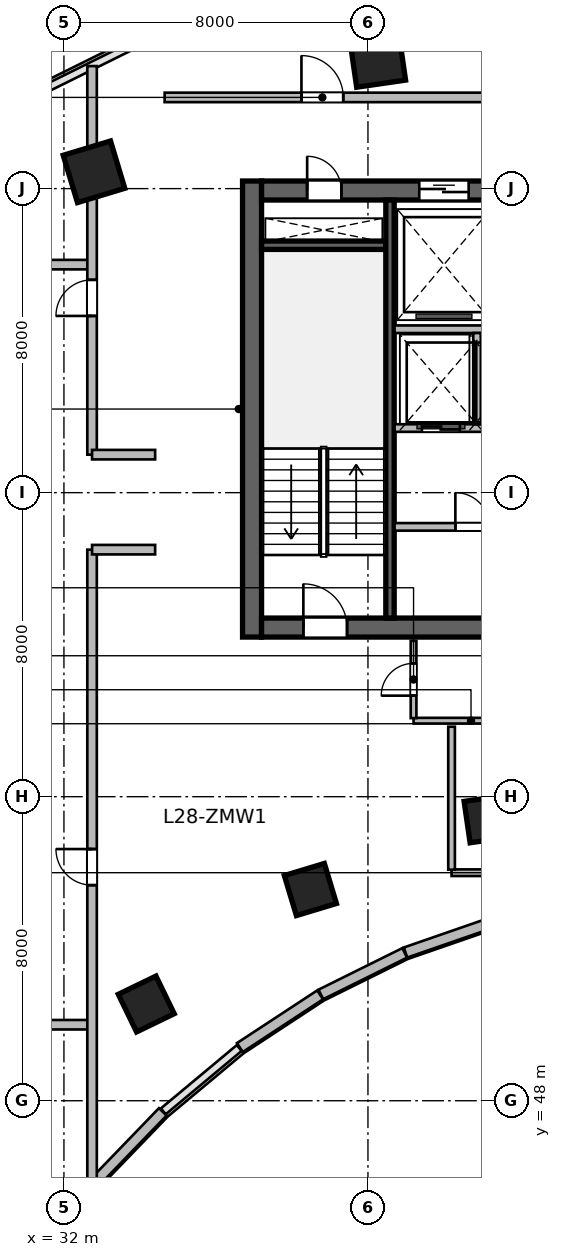
"""IFC4 building model, lengths in metres.
Left out: names, types, materials, properties, quantities, classifications, styles, units other than length and angle.
Written with IfcOpenShell. Run it as: python <this file> out.ifc"""

import sys

from ifc_helpers import new_model, si_unit, direction, frame, frame_2d, origin, origin_2d, place, context, subcontext, project, spatial, rectangle, extrude, source, transform, mapped, element, fill, save


model = new_model("IFC4")
c1 = context("Model", 3, precision=1e-05, world=origin(), true_north=direction((0.0, 1.0)))
c2 = subcontext(c1, "Body", "Model", "MODEL_VIEW")
j1 = project(units=[si_unit("LENGTHUNIT", "METRE"), si_unit("PLANEANGLEUNIT", "RADIAN")], contexts=[c1])
p1 = place(None, origin())
s1 = spatial("IfcSite", under=j1, at=p1, CompositionType="ELEMENT")
p2 = place(p1, origin())
s2 = spatial("IfcBuilding", under=s1, at=p2, CompositionType="ELEMENT")
p3 = place(p2, frame((0.0, 0.0, 119.4)))
s3 = spatial("IfcBuildingStorey", under=s2, at=p3, CompositionType="ELEMENT", Elevation=119.4)
m1 = source(origin(), c2, "Body", "SweptSolid", [
    extrude(rectangle(XDim=12.0, YDim=0.5, at=frame_2d((6.0, 0.0))), origin(), (0.0, 0.0, 1.0), 3.9),
])
p4 = place(p3, frame((36.95, 60.2, 0.0), z_axis=(0.0, 0.0, 1.0), x_axis=(0.0, 1.0, 0.0)))
e1 = element("IfcWall", 1, at=p4, inside=s3, PredefinedType="SHEAR", context=c2, shape_type="MappedRepresentation", body=[
    mapped(m1, transform((0.0, 0.0, 0.0), scale=1.0)),
])
m2 = source(origin(), c2, "Body", "SweptSolid", [
    extrude(rectangle(XDim=21.6, YDim=0.5, at=frame_2d((10.8, 0.0))), origin(), (0.0, 0.0, 1.0), 3.9),
])
p5 = place(p3, frame((37.2, 60.45, 0.0), z_axis=(0.0, 0.0, 1.0), x_axis=(1.0, 0.0, 0.0)))
e2 = element("IfcWall", 2, at=p5, inside=s3, PredefinedType="SHEAR", context=c2, shape_type="MappedRepresentation", body=[
    mapped(m2, transform((0.0, 0.0, 0.0), scale=1.0)),
])
p6 = place(p5, frame((1.1, 0.0, 0.0)))
e3 = element("IfcOpeningElement", 3, at=p6, cuts=e2, PredefinedType="OPENING", context=c2, shape_type="SweptSolid", body=[
    extrude(rectangle(XDim=1.15, YDim=2.15, at=frame_2d((0.575, 1.075))), frame((0.0, 0.26, 0.0), z_axis=(0.0, -1.0, 0.0), x_axis=(1.0, 0.0, 0.0)), (0.0, 0.0, 1.0), 0.52),
])
p7 = place(p5, frame((19.5, 0.0, 0.0)))
e4 = element("IfcOpeningElement", 4, at=p7, cuts=e2, PredefinedType="OPENING", context=c2, shape_type="SweptSolid", body=[
    extrude(rectangle(XDim=0.9, YDim=2.1, at=frame_2d((0.45, 1.05))), frame((0.0, 0.26, 0.0), z_axis=(0.0, -1.0, 0.0), x_axis=(1.0, 0.0, 0.0)), (0.0, 0.0, 1.0), 0.52),
])
p8 = place(p5, frame((12.02, 0.0, 0.0)))
e5 = element("IfcOpeningElement", 5, at=p8, cuts=e2, PredefinedType="OPENING", context=c2, shape_type="SweptSolid", body=[
    extrude(rectangle(XDim=1.6, YDim=2.15, at=frame_2d((0.8, 1.075))), frame((0.0, 0.26, 0.0), z_axis=(0.0, -1.0, 0.0), x_axis=(1.0, 0.0, 0.0)), (0.0, 0.0, 1.0), 0.52),
])
p9 = place(p3, frame((37.2, 71.95, 0.0), z_axis=(0.0, 0.0, 1.0), x_axis=(1.0, 0.0, 0.0)))
e6 = element("IfcWall", 6, at=p9, inside=s3, PredefinedType="SHEAR", context=c2, shape_type="MappedRepresentation", body=[
    mapped(m2, transform((0.0, 0.0, 0.0), scale=1.0)),
])
p10 = place(p9, frame((1.2, 0.0, 0.0)))
e7 = element("IfcOpeningElement", 7, at=p10, cuts=e6, PredefinedType="OPENING", context=c2, shape_type="SweptSolid", body=[
    extrude(rectangle(XDim=0.9, YDim=2.1, at=frame_2d((0.45, 1.05))), frame((0.0, 0.26, 0.0), z_axis=(0.0, -1.0, 0.0), x_axis=(1.0, 0.0, 0.0)), (0.0, 0.0, 1.0), 0.52),
])
p11 = place(p9, frame((14.7, 0.0, 0.0)))
e8 = element("IfcOpeningElement", 8, at=p11, cuts=e6, PredefinedType="OPENING", context=c2, shape_type="SweptSolid", body=[
    extrude(rectangle(XDim=1.2, YDim=2.15, at=frame_2d((0.6, 1.075))), frame((0.0, 0.26, 0.0), z_axis=(0.0, -1.0, 0.0), x_axis=(1.0, 0.0, 0.0)), (0.0, 0.0, 1.0), 0.52),
])
p12 = place(p9, frame((4.15, 0.0, 0.0)))
e9 = element("IfcOpeningElement", 9, at=p12, cuts=e6, PredefinedType="OPENING", context=c2, shape_type="SweptSolid", body=[
    extrude(rectangle(XDim=1.3, YDim=2.15, at=frame_2d((0.65, 1.075))), frame((0.0, 0.26, 0.0), z_axis=(0.0, -1.0, 0.0), x_axis=(1.0, 0.0, 0.0)), (0.0, 0.0, 1.0), 0.52),
])
p13 = place(p9, frame((7.25, 0.0, 0.0)))
e10 = element("IfcOpeningElement", 10, at=p13, cuts=e6, PredefinedType="OPENING", context=c2, shape_type="SweptSolid", body=[
    extrude(rectangle(XDim=0.9, YDim=2.1, at=frame_2d((0.45, 1.05))), frame((0.0, 0.26, 0.0), z_axis=(0.0, -1.0, 0.0), x_axis=(1.0, 0.0, 0.0)), (0.0, 0.0, 1.0), 0.52),
])
m3 = source(origin(), c2, "Body", "SweptSolid", [
    extrude(rectangle(XDim=3.27, YDim=0.22, at=frame_2d((1.635, 0.0))), origin(), (0.0, 0.0, 1.0), 3.9),
])
p14 = place(p3, frame((37.2, 70.51, 0.0), z_axis=(0.0, 0.0, 1.0), x_axis=(1.0, 0.0, 0.0)))
e11 = element("IfcWall", 11, at=p14, inside=s3, PredefinedType="SHEAR", context=c2, shape_type="MappedRepresentation", body=[
    mapped(m3, transform((0.0, 0.0, 0.0), scale=1.0)),
])
m4 = source(origin(), c2, "Body", "SweptSolid", [
    extrude(rectangle(XDim=11.0, YDim=0.22, at=frame_2d((5.5, 0.0))), origin(), (0.0, 0.0, 1.0), 3.9),
])
p15 = place(p3, frame((40.58, 60.7, 0.0), z_axis=(0.0, 0.0, 1.0), x_axis=(0.0, 1.0, 0.0)))
e12 = element("IfcWall", 12, at=p15, inside=s3, PredefinedType="SHEAR", context=c2, shape_type="MappedRepresentation", body=[
    mapped(m4, transform((0.0, 0.0, 0.0), scale=1.0)),
])
m5 = source(origin(), c2, "Body", "SweptSolid", [
    extrude(rectangle(XDim=1.1, YDim=1.1, at=origin_2d()), origin(), (0.0, 0.0, 1.0), 3.9),
])
for number, where, z_axis, x_axis in (
    (13, (34.166, 50.545, 0.0), (0.0, 0.0, 1.0), (-0.436, 0.9, 0.0)),
    (14, (38.485, 53.558, 0.0), (0.0, 0.0, 1.0), (-0.289, 0.957, 0.0)),
):
    element("IfcColumn", number, at=place(p3, frame(where, z_axis=z_axis, x_axis=x_axis)), inside=s3, PredefinedType="COLUMN", context=c2, shape_type="MappedRepresentation", body=[
        mapped(m5, transform((0.0, 0.0, 0.0), scale=1.0)),
    ])
m6 = source(origin(), c2, "Body", "SweptSolid", [
    extrude(rectangle(XDim=1.3, YDim=1.3, at=origin_2d()), origin(), (0.0, 0.0, 1.0), 3.9),
])
p16 = place(p3, frame((32.791, 72.442, 0.0), z_axis=(0.0, 0.0, 1.0), x_axis=(-0.288697611798, 0.957420330337, 0.0)))
e15 = element("IfcColumn", 15, at=p16, inside=s3, PredefinedType="COLUMN", context=c2, shape_type="MappedRepresentation", body=[
    mapped(m6, transform((0.0, 0.0, 0.0), scale=1.0)),
])
p17 = place(p3, frame((43.154, 55.411, 0.0), z_axis=(0.0, 0.0, 1.0), x_axis=(-0.143492621991, 0.98965138682, 0.0)))
e16 = element("IfcColumn", 16, at=p17, inside=s3, PredefinedType="COLUMN", context=c2, shape_type="MappedRepresentation", body=[
    mapped(m5, transform((0.0, 0.0, 0.0), scale=1.0)),
])
p18 = place(p3, frame((40.253, 75.404, 0.0), z_axis=(0.0, 0.0, 1.0), x_axis=(-0.143492621991, 0.98965138682, 0.0)))
e17 = element("IfcColumn", 17, at=p18, inside=s3, PredefinedType="COLUMN", context=c2, shape_type="MappedRepresentation", body=[
    mapped(m6, transform((0.0, 0.0, 0.0), scale=1.0)),
])
m7 = source(origin(), c2, "Body", "SweptSolid", [
    extrude(rectangle(XDim=2.411, YDim=0.28, at=frame_2d((1.205, 0.0))), origin(), (0.0, 0.0, 1.0), 3.65),
])
p19 = place(p3, frame((43.266, 52.689, 0.0), z_axis=(0.0, 0.0, 1.0), x_axis=(-0.944880068161, -0.327416640982, 0.0)))
e18 = element("IfcWall", 18, at=p19, inside=s3, PredefinedType="SOLIDWALL", context=c2, shape_type="MappedRepresentation", body=[
    mapped(m7, transform((0.0, 0.0, 0.0), scale=1.0)),
])
m8 = source(origin(), c2, "Body", "SweptSolid", [
    extrude(rectangle(XDim=2.462, YDim=0.28, at=frame_2d((1.231, 0.0))), origin(), (0.0, 0.0, 1.0), 3.65),
])
p20 = place(p3, frame((40.967, 51.891, 0.0), z_axis=(0.0, 0.0, 1.0), x_axis=(-0.8959882207, -0.444077817917, 0.0)))
e19 = element("IfcWall", 19, at=p20, inside=s3, PredefinedType="SOLIDWALL", context=c2, shape_type="MappedRepresentation", body=[
    mapped(m8, transform((0.0, 0.0, 0.0), scale=1.0)),
])
m9 = source(origin(), c2, "Body", "SweptSolid", [
    extrude(rectangle(XDim=2.527, YDim=0.28, at=frame_2d((1.264, 0.0))), origin(), (0.0, 0.0, 1.0), 3.65),
])
p21 = place(p3, frame((38.742, 50.786, 0.0), z_axis=(0.0, 0.0, 1.0), x_axis=(-0.836011905051, -0.548711303523, 0.0)))
e20 = element("IfcWall", 20, at=p21, inside=s3, PredefinedType="SOLIDWALL", context=c2, shape_type="MappedRepresentation", body=[
    mapped(m9, transform((0.0, 0.0, 0.0), scale=1.0)),
])
m10 = source(origin(), c2, "Body", "SweptSolid", [
    extrude(rectangle(XDim=2.68, YDim=0.28, at=frame_2d((1.34, 0.0))), origin(), (0.0, 0.0, 1.0), 3.65),
])
p22 = place(p3, frame((34.601, 47.708, 0.0), z_axis=(0.0, 0.0, 1.0), x_axis=(-0.694561996568, -0.719432855049, 0.0)))
e21 = element("IfcWall", 21, at=p22, inside=s3, PredefinedType="SOLIDWALL", context=c2, shape_type="MappedRepresentation", body=[
    mapped(m10, transform((0.0, 0.0, 0.0), scale=1.0)),
])
m11 = source(origin(), c2, "Body", "SweptSolid", [
    extrude(rectangle(XDim=8.8, YDim=0.2, at=frame_2d((4.4, 0.0))), origin(), (0.0, 0.0, 1.0), 3.65),
])
p23 = place(p3, frame((40.7, 68.3, 0.0), z_axis=(0.0, 0.0, 1.0), x_axis=(1.0, 0.0, 0.0)))
e22 = element("IfcWall", 22, at=p23, inside=s3, PredefinedType="SOLIDWALL", context=c2, shape_type="MappedRepresentation", body=[
    mapped(m11, transform((0.0, 0.0, 0.0), scale=1.0)),
])
m12 = source(origin(), c2, "Body", "SweptSolid", [
    extrude(rectangle(XDim=8.02, YDim=0.2, at=frame_2d((4.01, 0.0))), origin(), (0.0, 0.0, 1.0), 3.65),
])
p24 = place(p3, frame((40.7, 63.1, 0.0), z_axis=(0.0, 0.0, 1.0), x_axis=(1.0, 0.0, 0.0)))
e23 = element("IfcWall", 23, at=p24, inside=s3, PredefinedType="SOLIDWALL", context=c2, shape_type="MappedRepresentation", body=[
    mapped(m12, transform((0.0, 0.0, 0.0), scale=1.0)),
])
p25 = place(p24, frame((1.6, 0.0, 0.0)))
e24 = element("IfcOpeningElement", 24, at=p25, cuts=e23, PredefinedType="OPENING", context=c2, shape_type="SweptSolid", body=[
    extrude(rectangle(XDim=0.9, YDim=2.1, at=frame_2d((0.45, 1.05))), frame((0.0, 0.11, 0.0), z_axis=(0.0, -1.0, 0.0), x_axis=(1.0, 0.0, 0.0)), (0.0, 0.0, 1.0), 0.22),
])
p26 = place(p24, frame((5.54, 0.0, 0.0)))
e25 = element("IfcOpeningElement", 25, at=p26, cuts=e23, PredefinedType="OPENING", context=c2, shape_type="SweptSolid", body=[
    extrude(rectangle(XDim=0.9, YDim=2.1, at=frame_2d((0.45, 1.05))), frame((0.0, 0.11, 0.0), z_axis=(0.0, -1.0, 0.0), x_axis=(1.0, 0.0, 0.0)), (0.0, 0.0, 1.0), 0.22),
])
p27 = place(p3, frame((40.7, 65.7, 0.0), z_axis=(0.0, 0.0, 1.0), x_axis=(1.0, 0.0, 0.0)))
e26 = element("IfcWall", 26, at=p27, inside=s3, PredefinedType="SOLIDWALL", context=c2, shape_type="MappedRepresentation", body=[
    mapped(m11, transform((0.0, 0.0, 0.0), scale=1.0)),
])
p28 = place(p27, frame((0.72, 0.0, 0.0)))
e27 = element("IfcOpeningElement", 27, at=p28, cuts=e26, PredefinedType="OPENING", context=c2, shape_type="SweptSolid", body=[
    extrude(rectangle(XDim=1.0, YDim=2.15, at=frame_2d((0.5, 1.075))), frame((0.0, 0.11, 0.0), z_axis=(0.0, -1.0, 0.0), x_axis=(1.0, 0.0, 0.0)), (0.0, 0.0, 1.0), 0.22),
])
p29 = place(p27, frame((2.62, 0.0, 0.0)))
e28 = element("IfcOpeningElement", 28, at=p29, cuts=e26, PredefinedType="OPENING", context=c2, shape_type="SweptSolid", body=[
    extrude(rectangle(XDim=1.0, YDim=2.15, at=frame_2d((0.5, 1.075))), frame((0.0, 0.11, 0.0), z_axis=(0.0, -1.0, 0.0), x_axis=(1.0, 0.0, 0.0)), (0.0, 0.0, 1.0), 0.22),
])
p30 = place(p27, frame((4.55, 0.0, 0.0)))
e29 = element("IfcOpeningElement", 29, at=p30, cuts=e26, PredefinedType="OPENING", context=c2, shape_type="SweptSolid", body=[
    extrude(rectangle(XDim=1.0, YDim=2.15, at=frame_2d((0.5, 1.075))), frame((0.0, 0.11, 0.0), z_axis=(0.0, -1.0, 0.0), x_axis=(1.0, 0.0, 0.0)), (0.0, 0.0, 1.0), 0.22),
])
p31 = place(p27, frame((6.55, 0.0, 0.0)))
e30 = element("IfcOpeningElement", 30, at=p31, cuts=e26, PredefinedType="OPENING", context=c2, shape_type="SweptSolid", body=[
    extrude(rectangle(XDim=1.0, YDim=2.15, at=frame_2d((0.5, 1.075))), frame((0.0, 0.11, 0.0), z_axis=(0.0, -1.0, 0.0), x_axis=(1.0, 0.0, 0.0)), (0.0, 0.0, 1.0), 0.22),
])
m13 = source(origin(), c2, "Body", "SweptSolid", [
    extrude(rectangle(XDim=2.4, YDim=0.2, at=frame_2d((1.2, 0.0))), origin(), (0.0, 0.0, 1.0), 3.65),
])
p32 = place(p3, frame((42.87, 65.8, 0.0), z_axis=(0.0, 0.0, 1.0), x_axis=(0.0, 1.0, 0.0)))
e31 = element("IfcWall", 31, at=p32, inside=s3, PredefinedType="SOLIDWALL", context=c2, shape_type="MappedRepresentation", body=[
    mapped(m13, transform((0.0, 0.0, 0.0), scale=1.0)),
])
m14 = source(origin(), c2, "Body", "SweptSolid", [
    extrude(rectangle(XDim=5.4, YDim=0.15, at=frame_2d((2.7, 0.0))), origin(), (0.0, 0.0, 1.0), 3.65),
])
p33 = place(p3, frame((41.2, 58.0, 0.0), z_axis=(0.0, 0.0, 1.0), x_axis=(1.0, 0.0, 0.0)))
e32 = element("IfcWall", 32, at=p33, inside=s3, PredefinedType="PARTITIONING", context=c2, shape_type="MappedRepresentation", body=[
    mapped(m14, transform((0.0, 0.0, 0.0), scale=1.0)),
])
p34 = place(p33, frame((2.25, 0.0, 0.0)))
e33 = element("IfcOpeningElement", 33, at=p34, cuts=e32, PredefinedType="OPENING", context=c2, shape_type="SweptSolid", body=[
    extrude(rectangle(XDim=0.9, YDim=2.08, at=frame_2d((0.45, 1.04))), frame((0.0, 0.085, 0.0), z_axis=(0.0, -1.0, 0.0), x_axis=(1.0, 0.0, 0.0)), (0.0, 0.0, 1.0), 0.17),
])
m15 = source(origin(), c2, "Body", "SweptSolid", [
    extrude(rectangle(XDim=2.033, YDim=0.15, at=frame_2d((1.016, 0.0))), origin(), (0.0, 0.0, 1.0), 3.65),
])
p35 = place(p3, frame((41.2, 58.067, 0.0), z_axis=(0.0, 0.0, 1.0), x_axis=(0.0, 1.0, 0.0)))
e34 = element("IfcWall", 34, at=p35, inside=s3, PredefinedType="PARTITIONING", context=c2, shape_type="MappedRepresentation", body=[
    mapped(m15, transform((0.0, 0.0, 0.0), scale=1.0)),
])
p36 = place(p35, frame((0.591, 0.0, 0.0)))
e35 = element("IfcOpeningElement", 35, at=p36, cuts=e34, PredefinedType="OPENING", context=c2, shape_type="SweptSolid", body=[
    extrude(rectangle(XDim=0.85, YDim=2.1, at=frame_2d((0.425, 1.05))), frame((0.0, 0.085, 0.0), z_axis=(0.0, -1.0, 0.0), x_axis=(1.0, 0.0, 0.0)), (0.0, 0.0, 1.0), 0.17),
])
m16 = source(origin(), c2, "Body", "SweptSolid", [
    extrude(rectangle(XDim=4.176, YDim=0.175, at=frame_2d((2.088, 0.0))), origin(), (0.0, 0.0, 1.0), 3.65),
])
p37 = place(p3, frame((42.2, 54.0, 0.0), z_axis=(0.0, 0.0, 1.0), x_axis=(1.0, 0.0, 0.0)))
e36 = element("IfcWall", 36, at=p37, inside=s3, PredefinedType="PARTITIONING", context=c2, shape_type="MappedRepresentation", body=[
    mapped(m16, transform((0.0, 0.0, 0.0), scale=1.0)),
])
m17 = source(origin(), c2, "Body", "SweptSolid", [
    extrude(rectangle(XDim=3.763, YDim=0.175, at=frame_2d((1.881, 0.0))), origin(), (0.0, 0.0, 1.0), 3.65),
])
p38 = place(p3, frame((42.2, 54.079, 0.0), z_axis=(0.0, 0.0, 1.0), x_axis=(0.0, 1.0, 0.0)))
e37 = element("IfcWall", 37, at=p38, inside=s3, PredefinedType="PARTITIONING", context=c2, shape_type="MappedRepresentation", body=[
    mapped(m17, transform((0.0, 0.0, 0.0), scale=1.0)),
])
m18 = source(origin(), c2, "Body", "SweptSolid", [
    extrude(rectangle(XDim=2.5, YDim=0.25, at=frame_2d((1.25, 0.0))), origin(), (0.0, 0.0, 1.0), 3.65),
])
for number, where, z_axis, x_axis in (
    (38, (30.2, 50.0, 0.0), (0.0, 0.0, 1.0), (1.0, 0.0, 0.0)),
    (39, (30.2, 70.0, 0.0), (0.0, 0.0, 1.0), (1.0, 0.0, 0.0)),
):
    element("IfcWall", number, at=place(p3, frame(where, z_axis=z_axis, x_axis=x_axis)), inside=s3, PredefinedType="PARTITIONING", context=c2, shape_type="MappedRepresentation", body=[
        mapped(m18, transform((0.0, 0.0, 0.0), scale=1.0)),
    ])
m19 = source(origin(), c2, "Body", "SweptSolid", [
    extrude(rectangle(XDim=9.2, YDim=0.25, at=frame_2d((4.6, 0.0))), origin(), (0.0, 0.0, 1.0), 3.022),
])
p39 = place(p3, frame((34.65, 74.4, 0.0), z_axis=(0.0, 0.0, 1.0), x_axis=(1.0, 0.0, 0.0)))
e40 = element("IfcWall", 40, at=p39, inside=s3, PredefinedType="PARTITIONING", context=c2, shape_type="MappedRepresentation", body=[
    mapped(m19, transform((0.0, 0.0, 0.0), scale=1.0)),
])
p40 = place(p39, frame((3.6, 0.0, 0.0)))
e41 = element("IfcOpeningElement", 41, at=p40, cuts=e40, PredefinedType="OPENING", context=c2, shape_type="SweptSolid", body=[
    extrude(rectangle(XDim=1.1, YDim=2.15, at=frame_2d((0.55, 1.075))), frame((0.0, 0.135, 0.0), z_axis=(0.0, -1.0, 0.0), x_axis=(1.0, 0.0, 0.0)), (0.0, 0.0, 1.0), 0.27),
])
m20 = source(origin(), c2, "Body", "SweptSolid", [
    extrude(rectangle(XDim=16.706, YDim=0.25, at=frame_2d((8.353, 0.0))), origin(), (0.0, 0.0, 1.0), 2.942),
])
p41 = place(p3, frame((32.74, 45.794, 0.0), z_axis=(0.0, 0.0, 1.0), x_axis=(0.0, 1.0, 0.0)))
e42 = element("IfcWall", 42, at=p41, inside=s3, PredefinedType="PARTITIONING", context=c2, shape_type="MappedRepresentation", body=[
    mapped(m20, transform((0.0, 0.0, 0.0), scale=1.0)),
])
p42 = place(p41, frame((7.878, 0.0, 0.0)))
e43 = element("IfcOpeningElement", 43, at=p42, cuts=e42, PredefinedType="OPENING", context=c2, shape_type="SweptSolid", body=[
    extrude(rectangle(XDim=0.95, YDim=2.1, at=frame_2d((0.475, 1.05))), frame((0.0, 0.135, 0.0), z_axis=(0.0, -1.0, 0.0), x_axis=(1.0, 0.0, 0.0)), (0.0, 0.0, 1.0), 0.27),
])
m21 = source(origin(), c2, "Body", "SweptSolid", [
    extrude(rectangle(XDim=1.66, YDim=0.25, at=frame_2d((0.83, 0.0))), origin(), (0.0, 0.0, 1.0), 3.65),
])
p43 = place(p3, frame((32.74, 62.5, 0.0), z_axis=(0.0, 0.0, 1.0), x_axis=(1.0, 0.0, 0.0)))
e44 = element("IfcWall", 44, at=p43, inside=s3, PredefinedType="PARTITIONING", context=c2, shape_type="MappedRepresentation", body=[
    mapped(m21, transform((0.0, 0.0, 0.0), scale=1.0)),
])
m22 = source(origin(), c2, "Body", "SweptSolid", [
    extrude(rectangle(XDim=10.224, YDim=0.25, at=frame_2d((5.112, 0.0))), origin(), (0.0, 0.0, 1.0), 3.65),
])
p44 = place(p3, frame((32.74, 65.0, 0.0), z_axis=(0.0, 0.0, 1.0), x_axis=(0.0, 1.0, 0.0)))
e45 = element("IfcWall", 45, at=p44, inside=s3, PredefinedType="PARTITIONING", context=c2, shape_type="MappedRepresentation", body=[
    mapped(m22, transform((0.0, 0.0, 0.0), scale=1.0)),
])
p45 = place(p44, frame((3.65, 0.0, 0.0)))
e46 = element("IfcOpeningElement", 46, at=p45, cuts=e45, PredefinedType="OPENING", context=c2, shape_type="SweptSolid", body=[
    extrude(rectangle(XDim=0.95, YDim=2.1, at=frame_2d((0.475, 1.05))), frame((0.0, 0.135, 0.0), z_axis=(0.0, -1.0, 0.0), x_axis=(1.0, 0.0, 0.0)), (0.0, 0.0, 1.0), 0.27),
])
p46 = place(p3, frame((32.74, 65.0, 0.0), z_axis=(0.0, 0.0, 1.0), x_axis=(1.0, 0.0, 0.0)))
e47 = element("IfcWall", 47, at=p46, inside=s3, PredefinedType="PARTITIONING", context=c2, shape_type="MappedRepresentation", body=[
    mapped(m21, transform((0.0, 0.0, 0.0), scale=1.0)),
])
m23 = source(origin(), c2, "Body", "SweptSolid", [
    extrude(rectangle(XDim=1.15, YDim=2.15, at=frame_2d((0.575, 1.075))), frame((0.0, 0.025, 0.0), z_axis=(0.0, -1.0, 0.0), x_axis=(1.0, 0.0, 0.0)), (0.0, 0.0, 1.0), 0.05),
])
p47 = place(p6, origin())
e48 = element("IfcDoor", 48, at=p47, inside=s3, OperationType="SINGLE_SWING_LEFT", PredefinedType="DOOR", context=c2, shape_type="MappedRepresentation", body=[
    mapped(m23, transform((0.0, 0.0, 0.0), scale=1.0)),
])
fill(e3, e48)
m24 = source(origin(), c2, "Body", "SweptSolid", [
    extrude(rectangle(XDim=0.9, YDim=2.1, at=frame_2d((0.45, 1.05))), frame((0.0, 0.025, 0.0), z_axis=(0.0, -1.0, 0.0), x_axis=(1.0, 0.0, 0.0)), (0.0, 0.0, 1.0), 0.05),
])
p48 = place(p10, origin())
e49 = element("IfcDoor", 49, at=p48, inside=s3, OperationType="SINGLE_SWING_LEFT", PredefinedType="DOOR", context=c2, shape_type="MappedRepresentation", body=[
    mapped(m24, transform((0.0, 0.0, 0.0), scale=1.0)),
])
fill(e7, e49)
m25 = source(origin(), c2, "Body", "SweptSolid", [
    extrude(rectangle(XDim=1.3, YDim=2.15, at=frame_2d((0.65, 1.075))), frame((0.0, 0.025, 0.0), z_axis=(0.0, -1.0, 0.0), x_axis=(1.0, 0.0, 0.0)), (0.0, 0.0, 1.0), 0.05),
])
p49 = place(p12, origin())
e50 = element("IfcDoor", 50, at=p49, inside=s3, OperationType="DOUBLE_DOOR_SLIDING", PredefinedType="DOOR", context=c2, shape_type="MappedRepresentation", body=[
    mapped(m25, transform((0.0, 0.0, 0.0), scale=1.0)),
])
fill(e9, e50)
p50 = place(p25, origin())
e51 = element("IfcDoor", 51, at=p50, inside=s3, OperationType="SINGLE_SWING_LEFT", PredefinedType="DOOR", context=c2, shape_type="MappedRepresentation", body=[
    mapped(m24, transform((0.0, 0.0, 0.0), scale=1.0)),
])
fill(e24, e51)
m26 = source(origin(), c2, "Body", "SweptSolid", [
    extrude(rectangle(XDim=1.0, YDim=2.15, at=frame_2d((0.5, 1.075))), frame((0.0, 0.025, 0.0), z_axis=(0.0, -1.0, 0.0), x_axis=(1.0, 0.0, 0.0)), (0.0, 0.0, 1.0), 0.05),
])
p51 = place(p28, origin())
e52 = element("IfcDoor", 52, at=p51, inside=s3, OperationType="DOUBLE_DOOR_SLIDING", PredefinedType="DOOR", context=c2, shape_type="MappedRepresentation", body=[
    mapped(m26, transform((0.0, 0.0, 0.0), scale=1.0)),
])
fill(e27, e52)
m27 = source(origin(), c2, "Body", "SweptSolid", [
    extrude(rectangle(XDim=0.85, YDim=2.1, at=frame_2d((0.425, 1.05))), frame((0.0, 0.025, 0.0), z_axis=(0.0, -1.0, 0.0), x_axis=(1.0, 0.0, 0.0)), (0.0, 0.0, 1.0), 0.05),
])
p52 = place(p36, origin())
e53 = element("IfcDoor", 53, at=p52, inside=s3, OperationType="SINGLE_SWING_LEFT", PredefinedType="DOOR", context=c2, shape_type="MappedRepresentation", body=[
    mapped(m27, transform((0.0, 0.0, 0.0), scale=1.0)),
])
fill(e35, e53)
m28 = source(origin(), c2, "Body", "SweptSolid", [
    extrude(rectangle(XDim=1.1, YDim=2.15, at=frame_2d((0.55, 1.075))), frame((0.0, 0.025, 0.0), z_axis=(0.0, -1.0, 0.0), x_axis=(1.0, 0.0, 0.0)), (0.0, 0.0, 1.0), 0.05),
])
p53 = place(p40, origin())
e54 = element("IfcDoor", 54, at=p53, inside=s3, OperationType="SINGLE_SWING_LEFT", PredefinedType="DOOR", context=c2, shape_type="MappedRepresentation", body=[
    mapped(m28, transform((0.0, 0.0, 0.0), scale=1.0)),
])
fill(e41, e54)
m29 = source(origin(), c2, "Body", "SweptSolid", [
    extrude(rectangle(XDim=0.95, YDim=2.1, at=frame_2d((0.475, 1.05))), frame((0.0, 0.025, 0.0), z_axis=(0.0, -1.0, 0.0), x_axis=(1.0, 0.0, 0.0)), (0.0, 0.0, 1.0), 0.05),
])
p54 = place(p42, origin())
e55 = element("IfcDoor", 55, at=p54, inside=s3, OperationType="SINGLE_SWING_RIGHT", PredefinedType="DOOR", context=c2, shape_type="MappedRepresentation", body=[
    mapped(m29, transform((0.0, 0.0, 0.0), scale=1.0)),
])
fill(e43, e55)
p55 = place(p45, origin())
e56 = element("IfcDoor", 56, at=p55, inside=s3, OperationType="SINGLE_SWING_LEFT", PredefinedType="DOOR", context=c2, shape_type="MappedRepresentation", body=[
    mapped(m29, transform((0.0, 0.0, 0.0), scale=1.0)),
])
fill(e46, e56)
save(model, sys.argv[1])
